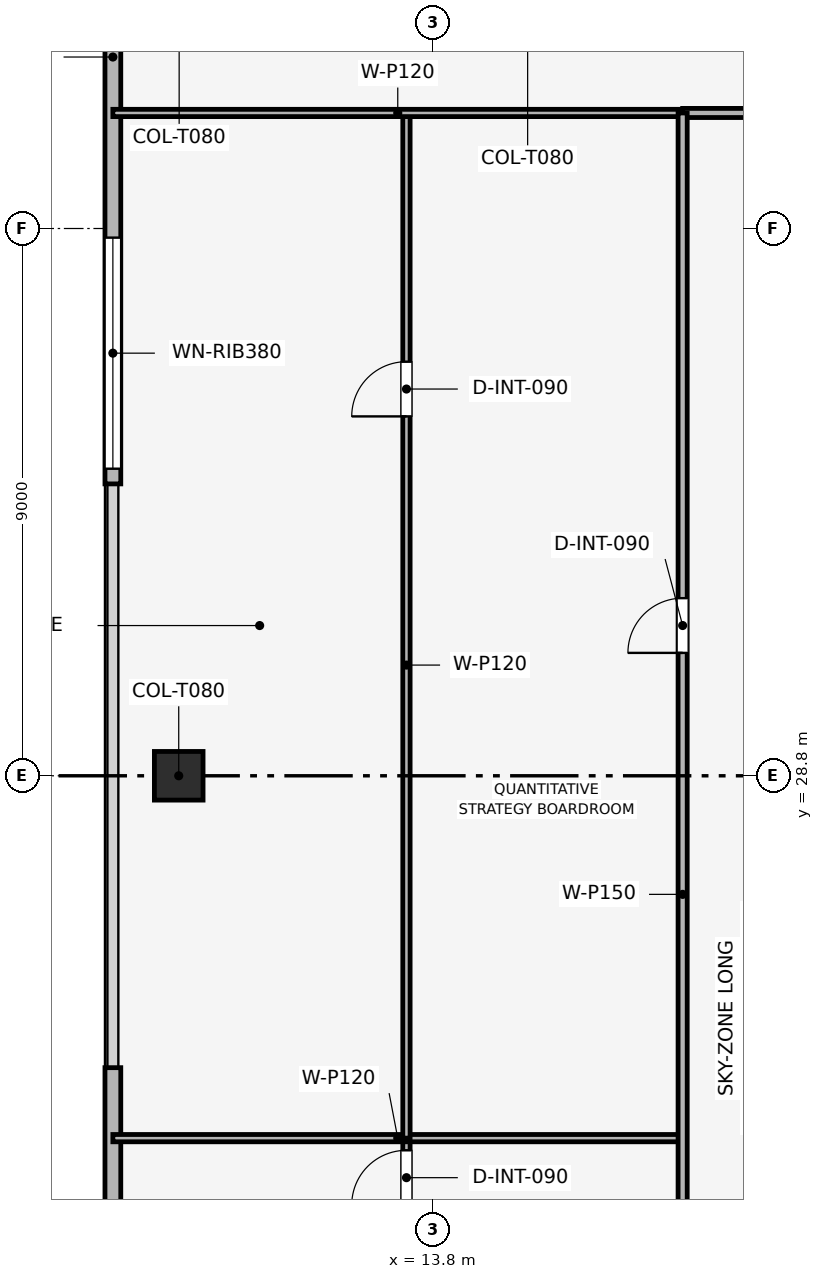
"""IFC4 building model, lengths in metres.
Left out: names, types, materials, properties, quantities, classifications, styles, units other than length and angle.
Written with IfcOpenShell. Run it as: python <this file> out.ifc"""

import sys

from ifc_helpers import new_model, si_unit, direction, frame, frame_2d, origin, origin_2d, place, context, subcontext, project, spatial, rectangle, extrude, element, fill, save


model = new_model("IFC4")
c1 = context("Model", 3, precision=1e-05, world=origin(), true_north=direction((0.0, 1.0)))
c2 = subcontext(c1, "Body", "Model", "MODEL_VIEW")
j1 = project(units=[si_unit("LENGTHUNIT", "METRE"), si_unit("PLANEANGLEUNIT", "RADIAN")], contexts=[c1])
p1 = place(None, origin())
s1 = spatial("IfcSite", under=j1, at=p1, CompositionType="ELEMENT")
p2 = place(p1, origin())
s2 = spatial("IfcBuilding", under=s1, at=p2, CompositionType="ELEMENT")
p3 = place(p2, frame((0.0, 0.0, 364.5)))
s3 = spatial("IfcBuildingStorey", under=s2, at=p3, CompositionType="ELEMENT", Elevation=364.5)
p4 = place(p3, frame((9.62, 41.789, 0.051), z_axis=(0.363749581663, -0.202047238794, 0.909320160964), x_axis=(0.485577069989, 0.874193862425, 0.0)))
e1 = element("IfcColumn", 1, at=p4, inside=s3, PredefinedType="COLUMN", context=c2, shape_type="SweptSolid", body=[
    extrude(rectangle(XDim=0.8, YDim=0.8, at=origin_2d()), origin(), (0.0, 0.0, 1.0), 4.539),
])
p5 = place(p3, frame((9.613, 28.8, 0.033), z_axis=(0.371428235787, 0.0, 0.928461666231), x_axis=(0.0, 1.0, 0.0)))
e2 = element("IfcColumn", 2, at=p5, inside=s3, PredefinedType="COLUMN", context=c2, shape_type="SweptSolid", body=[
    extrude(rectangle(XDim=0.8, YDim=0.8, at=origin_2d()), origin(), (0.0, 0.0, 1.0), 4.483),
])
p6 = place(p3, frame((8.53, 14.0, 0.0), z_axis=(0.0, 0.0, 1.0), x_axis=(0.0, 1.0, 0.0)))
e3 = element("IfcWall", 3, at=p6, inside=s3, PredefinedType="SOLIDWALL", context=c2, shape_type="SweptSolid", body=[
    extrude(rectangle(XDim=10.0, YDim=0.26, at=frame_2d((5.0, 0.0))), origin(), (0.0, 0.0, 1.0), 4.2),
])
p7 = place(p6, frame((3.417, 0.0, 0.9)))
e4 = element("IfcOpeningElement", 4, at=p7, cuts=e3, PredefinedType="OPENING", context=c2, shape_type="SweptSolid", body=[
    extrude(rectangle(XDim=3.8, YDim=1.9, at=frame_2d((1.9, 0.95))), frame((0.0, 0.14, 0.0), z_axis=(0.0, -1.0, 0.0), x_axis=(1.0, 0.0, 0.0)), (0.0, 0.0, 1.0), 0.28),
])
p8 = place(p3, frame((8.53, 33.6, 0.0), z_axis=(0.0, 0.0, 1.0), x_axis=(0.0, 1.0, 0.0)))
e5 = element("IfcWall", 5, at=p8, inside=s3, PredefinedType="SOLIDWALL", context=c2, shape_type="SweptSolid", body=[
    extrude(rectangle(XDim=10.0, YDim=0.26, at=frame_2d((5.0, 0.0))), origin(), (0.0, 0.0, 1.0), 4.2),
])
p9 = place(p8, frame((0.25, 0.0, 0.9)))
e6 = element("IfcOpeningElement", 6, at=p9, cuts=e5, PredefinedType="OPENING", context=c2, shape_type="SweptSolid", body=[
    extrude(rectangle(XDim=3.8, YDim=1.9, at=frame_2d((1.9, 0.95))), frame((0.0, 0.14, 0.0), z_axis=(0.0, -1.0, 0.0), x_axis=(1.0, 0.0, 0.0)), (0.0, 0.0, 1.0), 0.28),
])
p10 = place(p3, frame((13.358, 14.0, 0.0), z_axis=(0.0, 0.0, 1.0), x_axis=(0.0, 1.0, 0.0)))
e7 = element("IfcWall", 7, at=p10, inside=s3, PredefinedType="PARTITIONING", context=c2, shape_type="SweptSolid", body=[
    extrude(rectangle(XDim=8.841, YDim=0.12, at=frame_2d((4.42, 0.0))), origin(), (0.0, 0.0, 1.0), 3.785),
])
p11 = place(p10, frame((7.741, 0.0, 0.0)))
e8 = element("IfcOpeningElement", 8, at=p11, cuts=e7, PredefinedType="OPENING", context=c2, shape_type="SweptSolid", body=[
    extrude(rectangle(XDim=0.9, YDim=2.1, at=frame_2d((0.45, 1.05))), frame((0.0, 0.07, 0.0), z_axis=(0.0, -1.0, 0.0), x_axis=(1.0, 0.0, 0.0)), (0.0, 0.0, 1.0), 0.14),
])
p12 = place(p3, frame((8.53, 22.841, 0.0), z_axis=(0.0, 0.0, 1.0), x_axis=(1.0, 0.0, 0.0)))
e9 = element("IfcWall", 9, at=p12, inside=s3, PredefinedType="PARTITIONING", context=c2, shape_type="SweptSolid", body=[
    extrude(rectangle(XDim=9.37, YDim=0.12, at=frame_2d((4.685, 0.0))), origin(), (0.0, 0.0, 1.0), 3.825),
])
p13 = place(p3, frame((13.358, 22.841, 0.0), z_axis=(0.0, 0.0, 1.0), x_axis=(0.0, 1.0, 0.0)))
e10 = element("IfcWall", 10, at=p13, inside=s3, PredefinedType="PARTITIONING", context=c2, shape_type="SweptSolid", body=[
    extrude(rectangle(XDim=16.859, YDim=0.12, at=frame_2d((8.429, 0.0))), origin(), (0.0, 0.0, 1.0), 3.285),
])
p14 = place(p13, frame((11.869, 0.0, 0.0)))
e11 = element("IfcOpeningElement", 11, at=p14, cuts=e10, PredefinedType="OPENING", context=c2, shape_type="SweptSolid", body=[
    extrude(rectangle(XDim=0.9, YDim=2.1, at=frame_2d((0.45, 1.05))), frame((0.0, 0.07, 0.0), z_axis=(0.0, -1.0, 0.0), x_axis=(1.0, 0.0, 0.0)), (0.0, 0.0, 1.0), 0.14),
])
p15 = place(p3, frame((8.53, 39.7, 0.0), z_axis=(0.0, 0.0, 1.0), x_axis=(1.0, 0.0, 0.0)))
e12 = element("IfcWall", 12, at=p15, inside=s3, PredefinedType="PARTITIONING", context=c2, shape_type="SweptSolid", body=[
    extrude(rectangle(XDim=9.37, YDim=0.12, at=frame_2d((4.685, 0.0))), origin(), (0.0, 0.0, 1.0), 3.785),
])
p16 = place(p3, frame((17.9, 39.7, 0.0), z_axis=(0.0, 0.0, 1.0), x_axis=(1.0, 0.0, 0.0)))
e13 = element("IfcWall", 13, at=p16, inside=s3, PredefinedType="PARTITIONING", context=c2, shape_type="SweptSolid", body=[
    extrude(rectangle(XDim=21.8, YDim=0.15, at=frame_2d((10.9, 0.0))), origin(), (0.0, 0.0, 1.0), 3.285),
])
p17 = place(p16, frame((2.1, 0.0, 0.0)))
e14 = element("IfcOpeningElement", 14, at=p17, cuts=e13, PredefinedType="OPENING", context=c2, shape_type="SweptSolid", body=[
    extrude(rectangle(XDim=0.9, YDim=2.1, at=frame_2d((0.45, 1.05))), frame((0.0, 0.085, 0.0), z_axis=(0.0, -1.0, 0.0), x_axis=(1.0, 0.0, 0.0)), (0.0, 0.0, 1.0), 0.17),
])
p18 = place(p16, frame((6.05, 0.0, 0.0)))
e15 = element("IfcOpeningElement", 15, at=p18, cuts=e13, PredefinedType="OPENING", context=c2, shape_type="SweptSolid", body=[
    extrude(rectangle(XDim=0.9, YDim=2.1, at=frame_2d((0.45, 1.05))), frame((0.0, 0.085, 0.0), z_axis=(0.0, -1.0, 0.0), x_axis=(1.0, 0.0, 0.0)), (0.0, 0.0, 1.0), 0.17),
])
p19 = place(p16, frame((8.95, 0.0, 0.0)))
e16 = element("IfcOpeningElement", 16, at=p19, cuts=e13, PredefinedType="OPENING", context=c2, shape_type="SweptSolid", body=[
    extrude(rectangle(XDim=0.9, YDim=2.1, at=frame_2d((0.45, 1.05))), frame((0.0, 0.085, 0.0), z_axis=(0.0, -1.0, 0.0), x_axis=(1.0, 0.0, 0.0)), (0.0, 0.0, 1.0), 0.17),
])
p20 = place(p16, frame((11.7, 0.0, 0.0)))
e17 = element("IfcOpeningElement", 17, at=p20, cuts=e13, PredefinedType="OPENING", context=c2, shape_type="SweptSolid", body=[
    extrude(rectangle(XDim=0.95, YDim=2.1, at=frame_2d((0.475, 1.05))), frame((0.0, 0.085, 0.0), z_axis=(0.0, -1.0, 0.0), x_axis=(1.0, 0.0, 0.0)), (0.0, 0.0, 1.0), 0.17),
])
p21 = place(p16, frame((17.2, 0.0, 0.0)))
e18 = element("IfcOpeningElement", 18, at=p21, cuts=e13, PredefinedType="OPENING", context=c2, shape_type="SweptSolid", body=[
    extrude(rectangle(XDim=0.9, YDim=2.1, at=frame_2d((0.45, 1.05))), frame((0.0, 0.085, 0.0), z_axis=(0.0, -1.0, 0.0), x_axis=(1.0, 0.0, 0.0)), (0.0, 0.0, 1.0), 0.17),
])
p22 = place(p3, frame((17.9, 14.0, 0.0), z_axis=(0.0, 0.0, 1.0), x_axis=(0.0, 1.0, 0.0)))
e19 = element("IfcWall", 19, at=p22, inside=s3, PredefinedType="PARTITIONING", context=c2, shape_type="SweptSolid", body=[
    extrude(rectangle(XDim=25.7, YDim=0.15, at=frame_2d((12.85, 0.0))), origin(), (0.0, 0.0, 1.0), 3.285),
])
p23 = place(p22, frame((3.971, 0.0, 0.0)))
e20 = element("IfcOpeningElement", 20, at=p23, cuts=e19, PredefinedType="OPENING", context=c2, shape_type="SweptSolid", body=[
    extrude(rectangle(XDim=0.9, YDim=2.1, at=frame_2d((0.45, 1.05))), frame((0.0, 0.085, 0.0), z_axis=(0.0, -1.0, 0.0), x_axis=(1.0, 0.0, 0.0)), (0.0, 0.0, 1.0), 0.17),
])
p24 = place(p22, frame((16.821, 0.0, 0.0)))
e21 = element("IfcOpeningElement", 21, at=p24, cuts=e19, PredefinedType="OPENING", context=c2, shape_type="SweptSolid", body=[
    extrude(rectangle(XDim=0.9, YDim=2.1, at=frame_2d((0.45, 1.05))), frame((0.0, 0.085, 0.0), z_axis=(0.0, -1.0, 0.0), x_axis=(1.0, 0.0, 0.0)), (0.0, 0.0, 1.0), 0.17),
])
p25 = place(p9, origin())
e22 = element("IfcWindow", 22, at=p25, inside=s3, PartitioningType="SINGLE_PANEL", PredefinedType="WINDOW", context=c2, shape_type="SweptSolid", body=[
    extrude(rectangle(XDim=3.8, YDim=1.9, at=frame_2d((1.9, 0.95))), frame((0.0, 0.03, 0.0), z_axis=(0.0, -1.0, 0.0), x_axis=(1.0, 0.0, 0.0)), (0.0, 0.0, 1.0), 0.06),
])
fill(e6, e22)
p26 = place(p11, origin())
e23 = element("IfcDoor", 23, at=p26, inside=s3, OperationType="SINGLE_SWING_LEFT", PredefinedType="DOOR", context=c2, shape_type="SweptSolid", body=[
    extrude(rectangle(XDim=0.9, YDim=2.1, at=frame_2d((0.45, 1.05))), frame((0.0, 0.025, 0.0), z_axis=(0.0, -1.0, 0.0), x_axis=(1.0, 0.0, 0.0)), (0.0, 0.0, 1.0), 0.05),
])
fill(e8, e23)
p27 = place(p14, origin())
e24 = element("IfcDoor", 24, at=p27, inside=s3, OperationType="SINGLE_SWING_LEFT", PredefinedType="DOOR", context=c2, shape_type="SweptSolid", body=[
    extrude(rectangle(XDim=0.9, YDim=2.1, at=frame_2d((0.45, 1.05))), frame((0.0, 0.025, 0.0), z_axis=(0.0, -1.0, 0.0), x_axis=(1.0, 0.0, 0.0)), (0.0, 0.0, 1.0), 0.05),
])
fill(e11, e24)
p28 = place(p24, origin())
e25 = element("IfcDoor", 25, at=p28, inside=s3, OperationType="SINGLE_SWING_LEFT", PredefinedType="DOOR", context=c2, shape_type="SweptSolid", body=[
    extrude(rectangle(XDim=0.9, YDim=2.1, at=frame_2d((0.45, 1.05))), frame((0.0, 0.025, 0.0), z_axis=(0.0, -1.0, 0.0), x_axis=(1.0, 0.0, 0.0)), (0.0, 0.0, 1.0), 0.05),
])
fill(e21, e25)
save(model, sys.argv[1])
